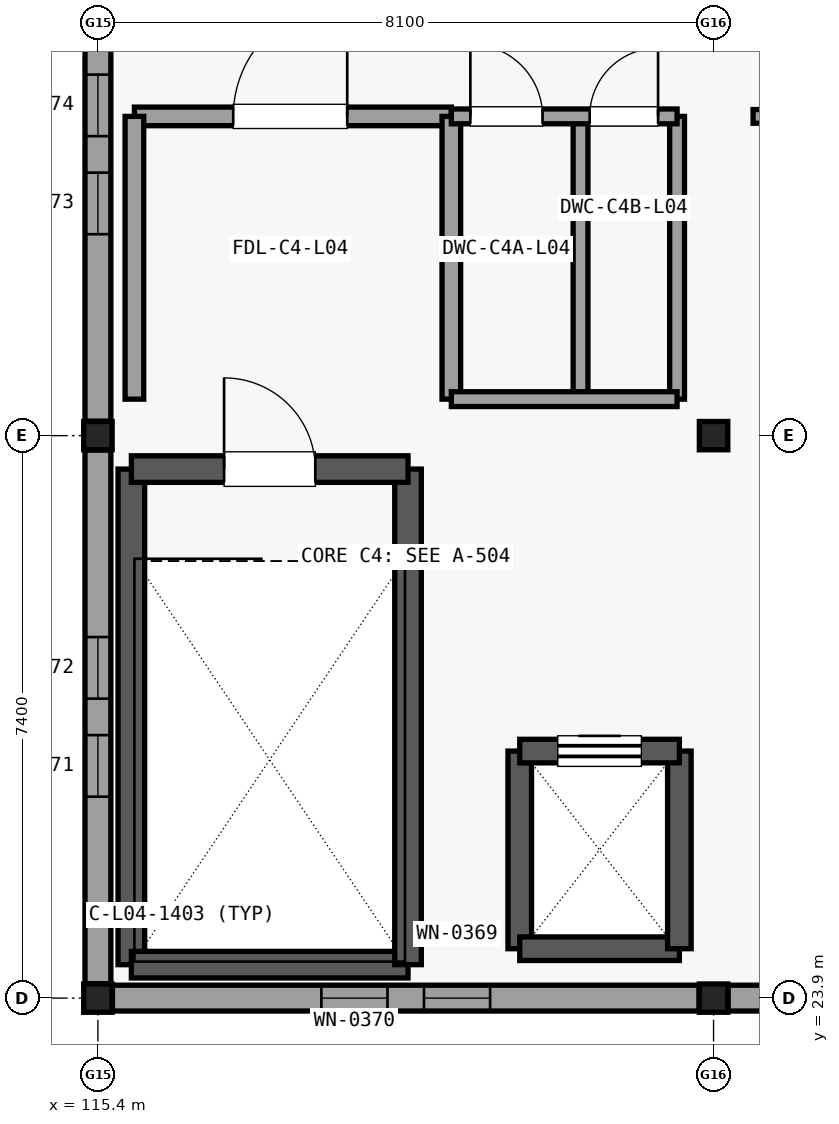
"""IFC4 building model, lengths in metres.
Left out: names, types, materials, properties, quantities, classifications, styles, units other than length and angle.
Written with IfcOpenShell. Run it as: python <this file> out.ifc"""

import sys

from ifc_helpers import new_model, si_unit, direction, frame, frame_2d, origin, origin_2d, place, context, subcontext, project, spatial, rectangle, i_section, extrude, element, fill, save


model = new_model("IFC4")
c1 = context("Model", 3, precision=1e-05, world=origin(), true_north=direction((0.0, 1.0)))
c2 = subcontext(c1, "Body", "Model", "MODEL_VIEW")
j1 = project(units=[si_unit("LENGTHUNIT", "METRE"), si_unit("PLANEANGLEUNIT", "RADIAN")], contexts=[c1])
p1 = place(None, origin())
s1 = spatial("IfcSite", under=j1, at=p1, CompositionType="ELEMENT")
p2 = place(p1, origin())
s2 = spatial("IfcBuilding", under=s1, at=p2, CompositionType="ELEMENT")
p3 = place(p2, frame((0.0, 0.0, 17.4)))
s3 = spatial("IfcBuildingStorey", under=s2, at=p3, CompositionType="ELEMENT", Elevation=17.4)
for number, where, z_axis, x_axis in (
    (1, (115.4, 23.9, 0.0), (0.0, 0.0, 1.0), (1.0, 0.0, 0.0)),
    (2, (115.4, 31.3, 0.0), (0.0, 0.0, 1.0), (1.0, 0.0, 0.0)),
    (3, (123.5, 23.9, 0.0), (0.0, 0.0, 1.0), (1.0, 0.0, 0.0)),
    (4, (123.5, 31.3, 0.0), (0.0, 0.0, 1.0), (1.0, 0.0, 0.0)),
):
    element("IfcColumn", number, at=place(p3, frame(where, z_axis=z_axis, x_axis=x_axis)), inside=s3, PredefinedType="COLUMN", context=c2, shape_type="SweptSolid", body=[
        extrude(i_section(OverallWidth=0.374, OverallDepth=0.372, WebThickness=0.016, FlangeThickness=0.026, at=origin_2d()), origin(), (0.0, 0.0, 1.0), 3.38),
    ])
p4 = place(p3, frame((123.309, 23.9, 0.0), z_axis=(0.0, 0.0, 1.0), x_axis=(-1.0, 0.0, 0.0)))
e5 = element("IfcWall", 5, at=p4, inside=s3, PredefinedType="SOLIDWALL", context=c2, shape_type="SweptSolid", body=[
    extrude(rectangle(XDim=7.718, YDim=0.34, at=frame_2d((3.859, 0.0))), origin(), (0.0, 0.0, 1.0), 2.908),
])
p5 = place(p4, frame((2.749, 0.0, 0.6)))
e6 = element("IfcOpeningElement", 6, at=p5, cuts=e5, PredefinedType="OPENING", context=c2, shape_type="SweptSolid", body=[
    extrude(rectangle(XDim=0.87, YDim=1.82, at=frame_2d((0.435, 0.91))), frame((0.0, 0.18, 0.0), z_axis=(0.0, -1.0, 0.0), x_axis=(1.0, 0.0, 0.0)), (0.0, 0.0, 1.0), 0.36),
])
p6 = place(p4, frame((4.099, 0.0, 0.6)))
e7 = element("IfcOpeningElement", 7, at=p6, cuts=e5, PredefinedType="OPENING", context=c2, shape_type="SweptSolid", body=[
    extrude(rectangle(XDim=0.87, YDim=1.82, at=frame_2d((0.435, 0.91))), frame((0.0, 0.18, 0.0), z_axis=(0.0, -1.0, 0.0), x_axis=(1.0, 0.0, 0.0)), (0.0, 0.0, 1.0), 0.36),
])
p7 = place(p3, frame((115.4, 24.09, 0.0), z_axis=(0.0, 0.0, 1.0), x_axis=(0.0, 1.0, 0.0)))
e8 = element("IfcWall", 8, at=p7, inside=s3, PredefinedType="SOLIDWALL", context=c2, shape_type="SweptSolid", body=[
    extrude(rectangle(XDim=7.02, YDim=0.34, at=frame_2d((3.51, 0.0))), origin(), (0.0, 0.0, 1.0), 2.908),
])
p8 = place(p7, frame((2.46, 0.0, 0.6)))
e9 = element("IfcOpeningElement", 9, at=p8, cuts=e8, PredefinedType="OPENING", context=c2, shape_type="SweptSolid", body=[
    extrude(rectangle(XDim=0.81, YDim=1.84, at=frame_2d((0.405, 0.92))), frame((0.0, 0.18, 0.0), z_axis=(0.0, -1.0, 0.0), x_axis=(1.0, 0.0, 0.0)), (0.0, 0.0, 1.0), 0.36),
])
p9 = place(p7, frame((3.75, 0.0, 0.6)))
e10 = element("IfcOpeningElement", 10, at=p9, cuts=e8, PredefinedType="OPENING", context=c2, shape_type="SweptSolid", body=[
    extrude(rectangle(XDim=0.81, YDim=1.84, at=frame_2d((0.405, 0.92))), frame((0.0, 0.18, 0.0), z_axis=(0.0, -1.0, 0.0), x_axis=(1.0, 0.0, 0.0)), (0.0, 0.0, 1.0), 0.36),
])
p10 = place(p3, frame((115.4, 31.49, 0.0), z_axis=(0.0, 0.0, 1.0), x_axis=(0.0, 1.0, 0.0)))
e11 = element("IfcWall", 11, at=p10, inside=s3, PredefinedType="SOLIDWALL", context=c2, shape_type="SweptSolid", body=[
    extrude(rectangle(XDim=7.02, YDim=0.34, at=frame_2d((3.51, 0.0))), origin(), (0.0, 0.0, 1.0), 2.908),
])
p11 = place(p10, frame((2.46, 0.0, 0.6)))
e12 = element("IfcOpeningElement", 12, at=p11, cuts=e11, PredefinedType="OPENING", context=c2, shape_type="SweptSolid", body=[
    extrude(rectangle(XDim=0.81, YDim=1.84, at=frame_2d((0.405, 0.92))), frame((0.0, 0.18, 0.0), z_axis=(0.0, -1.0, 0.0), x_axis=(1.0, 0.0, 0.0)), (0.0, 0.0, 1.0), 0.36),
])
p12 = place(p10, frame((3.75, 0.0, 0.6)))
e13 = element("IfcOpeningElement", 13, at=p12, cuts=e11, PredefinedType="OPENING", context=c2, shape_type="SweptSolid", body=[
    extrude(rectangle(XDim=0.81, YDim=1.84, at=frame_2d((0.405, 0.92))), frame((0.0, 0.18, 0.0), z_axis=(0.0, -1.0, 0.0), x_axis=(1.0, 0.0, 0.0)), (0.0, 0.0, 1.0), 0.36),
])
p13 = place(p3, frame((131.409, 23.9, 0.0), z_axis=(0.0, 0.0, 1.0), x_axis=(-1.0, 0.0, 0.0)))
e14 = element("IfcWall", 14, at=p13, inside=s3, PredefinedType="SOLIDWALL", context=c2, shape_type="SweptSolid", body=[
    extrude(rectangle(XDim=7.718, YDim=0.34, at=frame_2d((3.859, 0.0))), origin(), (0.0, 0.0, 1.0), 2.908),
])
p14 = place(p13, frame((2.749, 0.0, 0.6)))
e15 = element("IfcOpeningElement", 15, at=p14, cuts=e14, PredefinedType="OPENING", context=c2, shape_type="SweptSolid", body=[
    extrude(rectangle(XDim=0.87, YDim=1.82, at=frame_2d((0.435, 0.91))), frame((0.0, 0.18, 0.0), z_axis=(0.0, -1.0, 0.0), x_axis=(1.0, 0.0, 0.0)), (0.0, 0.0, 1.0), 0.36),
])
p15 = place(p13, frame((4.099, 0.0, 0.6)))
e16 = element("IfcOpeningElement", 16, at=p15, cuts=e14, PredefinedType="OPENING", context=c2, shape_type="SweptSolid", body=[
    extrude(rectangle(XDim=0.87, YDim=1.82, at=frame_2d((0.435, 0.91))), frame((0.0, 0.18, 0.0), z_axis=(0.0, -1.0, 0.0), x_axis=(1.0, 0.0, 0.0)), (0.0, 0.0, 1.0), 0.36),
])
p16 = place(p3, frame((115.84, 24.34, 0.0), z_axis=(0.0, 0.0, 1.0), x_axis=(0.0, 1.0, 0.0)))
e17 = element("IfcWall", 17, at=p16, inside=s3, PredefinedType="SHEAR", context=c2, shape_type="SweptSolid", body=[
    extrude(rectangle(XDim=6.52, YDim=0.35, at=frame_2d((3.26, 0.0))), origin(), (0.0, 0.0, 1.0), 3.375),
])
p17 = place(p3, frame((115.84, 24.34, 0.0), z_axis=(0.0, 0.0, 1.0), x_axis=(1.0, 0.0, 0.0)))
e18 = element("IfcWall", 18, at=p17, inside=s3, PredefinedType="SHEAR", context=c2, shape_type="SweptSolid", body=[
    extrude(rectangle(XDim=3.64, YDim=0.35, at=frame_2d((1.82, 0.0))), origin(), (0.0, 0.0, 1.0), 3.375),
])
p18 = place(p3, frame((119.48, 24.34, 0.0), z_axis=(0.0, 0.0, 1.0), x_axis=(0.0, 1.0, 0.0)))
e19 = element("IfcWall", 19, at=p18, inside=s3, PredefinedType="SHEAR", context=c2, shape_type="SweptSolid", body=[
    extrude(rectangle(XDim=6.52, YDim=0.35, at=frame_2d((3.26, 0.0))), origin(), (0.0, 0.0, 1.0), 3.375),
])
p19 = place(p3, frame((115.84, 30.86, 0.0), z_axis=(0.0, 0.0, 1.0), x_axis=(1.0, 0.0, 0.0)))
e20 = element("IfcWall", 20, at=p19, inside=s3, PredefinedType="SHEAR", context=c2, shape_type="SweptSolid", body=[
    extrude(rectangle(XDim=3.64, YDim=0.35, at=frame_2d((1.82, 0.0))), origin(), (0.0, 0.0, 1.0), 3.375),
])
p20 = place(p19, frame((1.22, 0.0, 0.0)))
e21 = element("IfcOpeningElement", 21, at=p20, cuts=e20, PredefinedType="OPENING", context=c2, shape_type="SweptSolid", body=[
    extrude(rectangle(XDim=1.2, YDim=2.15, at=frame_2d((0.6, 1.075))), frame((0.0, 0.185, 0.0), z_axis=(0.0, -1.0, 0.0), x_axis=(1.0, 0.0, 0.0)), (0.0, 0.0, 1.0), 0.37),
])
p21 = place(p3, frame((120.95, 24.55, 0.0), z_axis=(0.0, 0.0, 1.0), x_axis=(0.0, 1.0, 0.0)))
e22 = element("IfcWall", 22, at=p21, inside=s3, PredefinedType="SHEAR", context=c2, shape_type="SweptSolid", body=[
    extrude(rectangle(XDim=2.6, YDim=0.31, at=frame_2d((1.3, 0.0))), origin(), (0.0, 0.0, 1.0), 3.375),
])
p22 = place(p3, frame((120.95, 24.55, 0.0), z_axis=(0.0, 0.0, 1.0), x_axis=(1.0, 0.0, 0.0)))
e23 = element("IfcWall", 23, at=p22, inside=s3, PredefinedType="SHEAR", context=c2, shape_type="SweptSolid", body=[
    extrude(rectangle(XDim=2.1, YDim=0.31, at=frame_2d((1.05, 0.0))), origin(), (0.0, 0.0, 1.0), 3.375),
])
p23 = place(p3, frame((123.05, 24.55, 0.0), z_axis=(0.0, 0.0, 1.0), x_axis=(0.0, 1.0, 0.0)))
e24 = element("IfcWall", 24, at=p23, inside=s3, PredefinedType="SHEAR", context=c2, shape_type="SweptSolid", body=[
    extrude(rectangle(XDim=2.6, YDim=0.31, at=frame_2d((1.3, 0.0))), origin(), (0.0, 0.0, 1.0), 3.375),
])
p24 = place(p3, frame((120.95, 27.15, 0.0), z_axis=(0.0, 0.0, 1.0), x_axis=(1.0, 0.0, 0.0)))
e25 = element("IfcWall", 25, at=p24, inside=s3, PredefinedType="SHEAR", context=c2, shape_type="SweptSolid", body=[
    extrude(rectangle(XDim=2.1, YDim=0.31, at=frame_2d((1.05, 0.0))), origin(), (0.0, 0.0, 1.0), 3.375),
])
p25 = place(p24, frame((0.5, 0.0, 0.0)))
e26 = element("IfcOpeningElement", 26, at=p25, cuts=e25, PredefinedType="OPENING", context=c2, shape_type="SweptSolid", body=[
    extrude(rectangle(XDim=1.1, YDim=2.15, at=frame_2d((0.55, 1.075))), frame((0.0, 0.165, 0.0), z_axis=(0.0, -1.0, 0.0), x_axis=(1.0, 0.0, 0.0)), (0.0, 0.0, 1.0), 0.33),
])
p26 = place(p3, frame((115.88, 35.5, 0.0), z_axis=(0.0, 0.0, 1.0), x_axis=(1.0, 0.0, 0.0)))
e27 = element("IfcWall", 27, at=p26, inside=s3, PredefinedType="PARTITIONING", context=c2, shape_type="SweptSolid", body=[
    extrude(rectangle(XDim=4.17, YDim=0.245, at=frame_2d((2.085, 0.0))), origin(), (0.0, 0.0, 1.0), 2.913),
])
p27 = place(p26, frame((1.3, 0.0, 0.0)))
e28 = element("IfcOpeningElement", 28, at=p27, cuts=e27, PredefinedType="OPENING", context=c2, shape_type="SweptSolid", body=[
    extrude(rectangle(XDim=1.5, YDim=2.15, at=frame_2d((0.75, 1.075))), frame((0.0, 0.133, 0.0), z_axis=(0.0, -1.0, 0.0), x_axis=(1.0, 0.0, 0.0)), (0.0, 0.0, 1.0), 0.265),
])
for number, where, z_axis, x_axis in (
    (29, (115.88, 31.78, 0.0), (0.0, 0.0, 1.0), (0.0, 1.0, 0.0)),
    (30, (120.05, 31.78, 0.0), (0.0, 0.0, 1.0), (0.0, 1.0, 0.0)),
):
    element("IfcWall", number, at=place(p3, frame(where, z_axis=z_axis, x_axis=x_axis)), inside=s3, PredefinedType="PARTITIONING", context=c2, shape_type="SweptSolid", body=[
        extrude(rectangle(XDim=3.72, YDim=0.245, at=frame_2d((1.86, 0.0))), origin(), (0.0, 0.0, 1.0), 2.913),
    ])
for number, where, z_axis, x_axis in (
    (31, (121.75, 31.78, 0.0), (0.0, 0.0, 1.0), (0.0, 1.0, 0.0)),
    (32, (123.02, 31.78, 0.0), (0.0, 0.0, 1.0), (0.0, 1.0, 0.0)),
):
    element("IfcWall", number, at=place(p3, frame(where, z_axis=z_axis, x_axis=x_axis)), inside=s3, PredefinedType="PARTITIONING", context=c2, shape_type="SweptSolid", body=[
        extrude(rectangle(XDim=3.72, YDim=0.195, at=frame_2d((1.86, 0.0))), origin(), (0.0, 0.0, 1.0), 2.913),
    ])
p28 = place(p3, frame((120.05, 31.78, 0.0), z_axis=(0.0, 0.0, 1.0), x_axis=(1.0, 0.0, 0.0)))
e33 = element("IfcWall", 33, at=p28, inside=s3, PredefinedType="PARTITIONING", context=c2, shape_type="SweptSolid", body=[
    extrude(rectangle(XDim=2.97, YDim=0.195, at=frame_2d((1.485, 0.0))), origin(), (0.0, 0.0, 1.0), 2.913),
])
p29 = place(p3, frame((120.05, 35.5, 0.0), z_axis=(0.0, 0.0, 1.0), x_axis=(1.0, 0.0, 0.0)))
e34 = element("IfcWall", 34, at=p29, inside=s3, PredefinedType="PARTITIONING", context=c2, shape_type="SweptSolid", body=[
    extrude(rectangle(XDim=2.97, YDim=0.195, at=frame_2d((1.485, 0.0))), origin(), (0.0, 0.0, 1.0), 2.913),
])
p30 = place(p29, frame((0.25, 0.0, 0.0)))
e35 = element("IfcOpeningElement", 35, at=p30, cuts=e34, PredefinedType="OPENING", context=c2, shape_type="SweptSolid", body=[
    extrude(rectangle(XDim=0.95, YDim=2.1, at=frame_2d((0.475, 1.05))), frame((0.0, 0.107, 0.0), z_axis=(0.0, -1.0, 0.0), x_axis=(1.0, 0.0, 0.0)), (0.0, 0.0, 1.0), 0.215),
])
p31 = place(p29, frame((1.82, 0.0, 0.0)))
e36 = element("IfcOpeningElement", 36, at=p31, cuts=e34, PredefinedType="OPENING", context=c2, shape_type="SweptSolid", body=[
    extrude(rectangle(XDim=0.9, YDim=2.1, at=frame_2d((0.45, 1.05))), frame((0.0, 0.107, 0.0), z_axis=(0.0, -1.0, 0.0), x_axis=(1.0, 0.0, 0.0)), (0.0, 0.0, 1.0), 0.215),
])
p32 = place(p3, frame((124.02, 35.5, 0.0), z_axis=(0.0, 0.0, 1.0), x_axis=(1.0, 0.0, 0.0)))
e37 = element("IfcWall", 37, at=p32, inside=s3, PredefinedType="PARTITIONING", context=c2, shape_type="SweptSolid", body=[
    extrude(rectangle(XDim=7.06, YDim=0.18, at=frame_2d((3.53, 0.0))), origin(), (0.0, 0.0, 1.0), 2.913),
])
p33 = place(p32, frame((2.88, 0.0, 0.0)))
e38 = element("IfcOpeningElement", 38, at=p33, cuts=e37, PredefinedType="OPENING", context=c2, shape_type="SweptSolid", body=[
    extrude(rectangle(XDim=1.3, YDim=2.2, at=frame_2d((0.65, 1.1))), frame((0.0, 0.1, 0.0), z_axis=(0.0, -1.0, 0.0), x_axis=(1.0, 0.0, 0.0)), (0.0, 0.0, 1.0), 0.2),
])
p34 = place(p5, origin())
e39 = element("IfcWindow", 39, at=p34, inside=s3, PartitioningType="SINGLE_PANEL", PredefinedType="WINDOW", context=c2, shape_type="SweptSolid", body=[
    extrude(rectangle(XDim=0.87, YDim=1.82, at=frame_2d((0.435, 0.91))), frame((0.0, 0.03, 0.0), z_axis=(0.0, -1.0, 0.0), x_axis=(1.0, 0.0, 0.0)), (0.0, 0.0, 1.0), 0.06),
])
fill(e6, e39)
p35 = place(p6, origin())
e40 = element("IfcWindow", 40, at=p35, inside=s3, PartitioningType="SINGLE_PANEL", PredefinedType="WINDOW", context=c2, shape_type="SweptSolid", body=[
    extrude(rectangle(XDim=0.87, YDim=1.82, at=frame_2d((0.435, 0.91))), frame((0.0, 0.03, 0.0), z_axis=(0.0, -1.0, 0.0), x_axis=(1.0, 0.0, 0.0)), (0.0, 0.0, 1.0), 0.06),
])
fill(e7, e40)
p36 = place(p8, origin())
e41 = element("IfcWindow", 41, at=p36, inside=s3, PartitioningType="SINGLE_PANEL", PredefinedType="WINDOW", context=c2, shape_type="SweptSolid", body=[
    extrude(rectangle(XDim=0.81, YDim=1.84, at=frame_2d((0.405, 0.92))), frame((0.0, 0.03, 0.0), z_axis=(0.0, -1.0, 0.0), x_axis=(1.0, 0.0, 0.0)), (0.0, 0.0, 1.0), 0.06),
])
fill(e9, e41)
p37 = place(p9, origin())
e42 = element("IfcWindow", 42, at=p37, inside=s3, PartitioningType="SINGLE_PANEL", PredefinedType="WINDOW", context=c2, shape_type="SweptSolid", body=[
    extrude(rectangle(XDim=0.81, YDim=1.84, at=frame_2d((0.405, 0.92))), frame((0.0, 0.03, 0.0), z_axis=(0.0, -1.0, 0.0), x_axis=(1.0, 0.0, 0.0)), (0.0, 0.0, 1.0), 0.06),
])
fill(e10, e42)
p38 = place(p11, origin())
e43 = element("IfcWindow", 43, at=p38, inside=s3, PartitioningType="SINGLE_PANEL", PredefinedType="WINDOW", context=c2, shape_type="SweptSolid", body=[
    extrude(rectangle(XDim=0.81, YDim=1.84, at=frame_2d((0.405, 0.92))), frame((0.0, 0.03, 0.0), z_axis=(0.0, -1.0, 0.0), x_axis=(1.0, 0.0, 0.0)), (0.0, 0.0, 1.0), 0.06),
])
fill(e12, e43)
p39 = place(p12, origin())
e44 = element("IfcWindow", 44, at=p39, inside=s3, PartitioningType="SINGLE_PANEL", PredefinedType="WINDOW", context=c2, shape_type="SweptSolid", body=[
    extrude(rectangle(XDim=0.81, YDim=1.84, at=frame_2d((0.405, 0.92))), frame((0.0, 0.03, 0.0), z_axis=(0.0, -1.0, 0.0), x_axis=(1.0, 0.0, 0.0)), (0.0, 0.0, 1.0), 0.06),
])
fill(e13, e44)
p40 = place(p20, origin())
e45 = element("IfcDoor", 45, at=p40, inside=s3, OperationType="SINGLE_SWING_LEFT", PredefinedType="DOOR", context=c2, shape_type="SweptSolid", body=[
    extrude(rectangle(XDim=1.2, YDim=2.15, at=frame_2d((0.6, 1.075))), frame((0.0, 0.025, 0.0), z_axis=(0.0, -1.0, 0.0), x_axis=(1.0, 0.0, 0.0)), (0.0, 0.0, 1.0), 0.05),
])
fill(e21, e45)
p41 = place(p25, origin())
e46 = element("IfcDoor", 46, at=p41, inside=s3, OperationType="SLIDING_TO_RIGHT", PredefinedType="DOOR", context=c2, shape_type="SweptSolid", body=[
    extrude(rectangle(XDim=1.1, YDim=2.15, at=frame_2d((0.55, 1.075))), frame((0.0, 0.025, 0.0), z_axis=(0.0, -1.0, 0.0), x_axis=(1.0, 0.0, 0.0)), (0.0, 0.0, 1.0), 0.05),
])
fill(e26, e46)
p42 = place(p27, origin())
e47 = element("IfcDoor", 47, at=p42, inside=s3, OperationType="SINGLE_SWING_RIGHT", PredefinedType="DOOR", context=c2, shape_type="SweptSolid", body=[
    extrude(rectangle(XDim=1.5, YDim=2.15, at=frame_2d((0.75, 1.075))), frame((0.0, 0.025, 0.0), z_axis=(0.0, -1.0, 0.0), x_axis=(1.0, 0.0, 0.0)), (0.0, 0.0, 1.0), 0.05),
])
fill(e28, e47)
p43 = place(p30, origin())
e48 = element("IfcDoor", 48, at=p43, inside=s3, OperationType="SINGLE_SWING_LEFT", PredefinedType="DOOR", context=c2, shape_type="SweptSolid", body=[
    extrude(rectangle(XDim=0.95, YDim=2.1, at=frame_2d((0.475, 1.05))), frame((0.0, 0.025, 0.0), z_axis=(0.0, -1.0, 0.0), x_axis=(1.0, 0.0, 0.0)), (0.0, 0.0, 1.0), 0.05),
])
fill(e35, e48)
p44 = place(p31, origin())
e49 = element("IfcDoor", 49, at=p44, inside=s3, OperationType="SINGLE_SWING_RIGHT", PredefinedType="DOOR", context=c2, shape_type="SweptSolid", body=[
    extrude(rectangle(XDim=0.9, YDim=2.1, at=frame_2d((0.45, 1.05))), frame((0.0, 0.025, 0.0), z_axis=(0.0, -1.0, 0.0), x_axis=(1.0, 0.0, 0.0)), (0.0, 0.0, 1.0), 0.05),
])
fill(e36, e49)
save(model, sys.argv[1])
